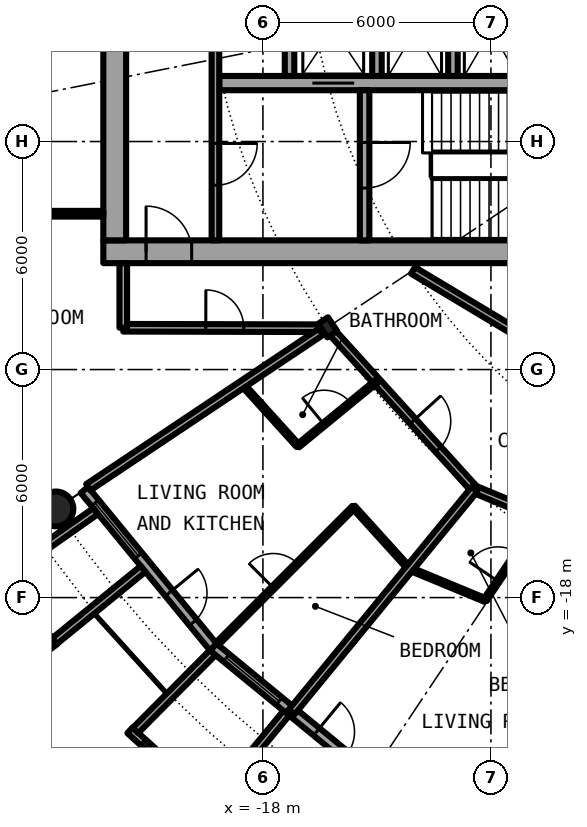
"""IFC4 building model, lengths in metres.
Left out: names, types, materials, properties, quantities, classifications, styles, units other than length and angle.
Written with IfcOpenShell. Run it as: python <this file> out.ifc"""

import sys

from ifc_helpers import new_model, si_unit, direction, frame, frame_2d, origin, origin_2d, place, context, subcontext, project, spatial, rectangle, circle, hollow_circle, i_section, extrude, element, fill, save


model = new_model("IFC4")
c1 = context("Model", 3, precision=1e-05, world=origin(), true_north=direction((0.0, 1.0)))
c2 = subcontext(c1, "Body", "Model", "MODEL_VIEW")
j1 = project(units=[si_unit("LENGTHUNIT", "METRE"), si_unit("PLANEANGLEUNIT", "RADIAN")], contexts=[c1])
p1 = place(None, origin())
s1 = spatial("IfcSite", under=j1, at=p1, CompositionType="ELEMENT")
p2 = place(p1, origin())
s2 = spatial("IfcBuilding", under=s1, at=p2, CompositionType="ELEMENT")
p3 = place(p2, frame((0.0, 0.0, 117.75)))
s3 = spatial("IfcBuildingStorey", under=s2, at=p3, CompositionType="ELEMENT", Elevation=117.75)
p4 = place(p3, frame((-23.448, -15.667, 0.0), z_axis=(0.0, 0.0, 1.0), x_axis=(1.0, 0.0, 0.0)))
e1 = element("IfcColumn", 1, at=p4, inside=s3, PredefinedType="COLUMN", context=c2, shape_type="SweptSolid", body=[
    extrude(hollow_circle(Radius=0.457, WallThickness=0.04, at=origin_2d()), origin(), (0.0, 0.0, 1.0), 3.05),
])
p5 = place(p3, frame((-16.297, -10.889, 0.0), z_axis=(0.0, 0.0, 1.0), x_axis=(-0.831469612303, -0.55557023302, 0.0)))
e2 = element("IfcColumn", 2, at=p5, inside=s3, PredefinedType="COLUMN", context=c2, shape_type="SweptSolid", body=[
    extrude(i_section(OverallWidth=0.307, OverallDepth=0.432, WebThickness=0.021, FlangeThickness=0.04, FilletRadius=0.027, at=origin_2d()), origin(), (0.0, 0.0, 1.0), 3.05),
])
p6 = place(p3, frame((-22.699, -15.167, 0.0), z_axis=(0.0, 0.0, 1.0), x_axis=(0.634382322723, -0.773019449054, 0.0)))
e3 = element("IfcWall", 3, at=p6, inside=s3, PredefinedType="SOLIDWALL", context=c2, shape_type="SweptSolid", body=[
    extrude(rectangle(XDim=5.352, YDim=0.25, at=frame_2d((2.676, 0.0))), origin(), (0.0, 0.0, 1.0), 2.7),
])
p7 = place(p6, frame((0.441, 0.0, 0.3)))
e4 = element("IfcOpeningElement", 4, at=p7, cuts=e3, PredefinedType="OPENING", context=c2, shape_type="SweptSolid", body=[
    extrude(rectangle(XDim=1.8, YDim=2.1, at=frame_2d((0.9, 1.05))), frame((0.0, 0.135, 0.0), z_axis=(0.0, -1.0, 0.0), x_axis=(1.0, 0.0, 0.0)), (0.0, 0.0, 1.0), 0.27),
])
p8 = place(p6, frame((3.51, 0.0, 0.0)))
e5 = element("IfcOpeningElement", 5, at=p8, cuts=e3, PredefinedType="OPENING", context=c2, shape_type="SweptSolid", body=[
    extrude(rectangle(XDim=1.0, YDim=2.2, at=frame_2d((0.5, 1.1))), frame((0.0, 0.135, 0.0), z_axis=(0.0, -1.0, 0.0), x_axis=(1.0, 0.0, 0.0)), (0.0, 0.0, 1.0), 0.27),
])
p9 = place(p3, frame((-24.94, -17.382, -0.03), z_axis=(0.0, 0.0, 1.0), x_axis=(0.603375996329, -0.797456837111, 0.0)))
e6 = element("IfcWall", 6, at=p9, inside=s3, PredefinedType="SOLIDWALL", context=c2, shape_type="SweptSolid", body=[
    extrude(rectangle(XDim=2.391, YDim=0.2, at=frame_2d((1.196, 0.0))), origin(), (0.0, 0.0, 1.0), 2.73),
])
p10 = place(p9, frame((0.156, 0.0, 0.33)))
e7 = element("IfcOpeningElement", 7, at=p10, cuts=e6, PredefinedType="OPENING", context=c2, shape_type="SweptSolid", body=[
    extrude(circle(Radius=1.04, at=frame_2d((1.04, 1.04))), frame((0.0, 0.11, 0.0), z_axis=(0.0, -1.0, 0.0), x_axis=(1.0, 0.0, 0.0)), (0.0, 0.0, 1.0), 0.22),
])
p11 = place(p3, frame((-22.402, -15.726, -0.03), z_axis=(0.0, 0.0, 1.0), x_axis=(-0.818275399393, -0.574826383135, 0.0)))
e8 = element("IfcWall", 8, at=p11, inside=s3, PredefinedType="SOLIDWALL", context=c2, shape_type="SweptSolid", body=[
    extrude(rectangle(XDim=2.929, YDim=0.2, at=frame_2d((1.465, 0.0))), origin(), (0.0, 0.0, 1.0), 2.73),
])
p12 = place(p3, frame((-21.155, -17.246, -0.03), z_axis=(0.0, 0.0, 1.0), x_axis=(-0.775179004516, -0.631741648902, 0.0)))
e9 = element("IfcWall", 9, at=p12, inside=s3, PredefinedType="SOLIDWALL", context=c2, shape_type="SweptSolid", body=[
    extrude(rectangle(XDim=3.006, YDim=0.2, at=frame_2d((1.503, 0.0))), origin(), (0.0, 0.0, 1.0), 2.73),
])
p13 = place(p3, frame((-19.304, -19.304, 0.0), z_axis=(0.0, 0.0, 1.0), x_axis=(0.773019449054, -0.634382322723, 0.0)))
e10 = element("IfcWall", 10, at=p13, inside=s3, PredefinedType="SOLIDWALL", context=c2, shape_type="SweptSolid", body=[
    extrude(rectangle(XDim=5.352, YDim=0.25, at=frame_2d((2.676, 0.0))), origin(), (0.0, 0.0, 1.0), 2.7),
])
p14 = place(p13, frame((0.441, 0.0, 0.3)))
e11 = element("IfcOpeningElement", 11, at=p14, cuts=e10, PredefinedType="OPENING", context=c2, shape_type="SweptSolid", body=[
    extrude(rectangle(XDim=1.8, YDim=2.1, at=frame_2d((0.9, 1.05))), frame((0.0, 0.135, 0.0), z_axis=(0.0, -1.0, 0.0), x_axis=(1.0, 0.0, 0.0)), (0.0, 0.0, 1.0), 0.27),
])
p15 = place(p13, frame((3.51, 0.0, 0.0)))
e12 = element("IfcOpeningElement", 12, at=p15, cuts=e10, PredefinedType="OPENING", context=c2, shape_type="SweptSolid", body=[
    extrude(rectangle(XDim=1.0, YDim=2.2, at=frame_2d((0.5, 1.1))), frame((0.0, 0.135, 0.0), z_axis=(0.0, -1.0, 0.0), x_axis=(1.0, 0.0, 0.0)), (0.0, 0.0, 1.0), 0.27),
])
p16 = place(p3, frame((-21.5, -21.493, -0.03), z_axis=(0.0, 0.0, 1.0), x_axis=(0.740998365753, -0.671506829416, 0.0)))
e13 = element("IfcWall", 13, at=p16, inside=s3, PredefinedType="SOLIDWALL", context=c2, shape_type="SweptSolid", body=[
    extrude(rectangle(XDim=2.993, YDim=0.2, at=frame_2d((1.497, 0.0))), origin(), (0.0, 0.0, 1.0), 2.73),
])
p17 = place(p16, frame((0.457, 0.0, 0.33)))
e14 = element("IfcOpeningElement", 14, at=p17, cuts=e13, PredefinedType="OPENING", context=c2, shape_type="SweptSolid", body=[
    extrude(circle(Radius=1.04, at=frame_2d((1.04, 1.04))), frame((0.0, 0.11, 0.0), z_axis=(0.0, -1.0, 0.0), x_axis=(1.0, 0.0, 0.0)), (0.0, 0.0, 1.0), 0.22),
])
p18 = place(p3, frame((-19.323, -19.45, -0.03), z_axis=(0.0, 0.0, 1.0), x_axis=(-0.704476739375, -0.709727076896, 0.0)))
e15 = element("IfcWall", 15, at=p18, inside=s3, PredefinedType="SOLIDWALL", context=c2, shape_type="SweptSolid", body=[
    extrude(rectangle(XDim=2.883, YDim=0.2, at=frame_2d((1.441, 0.0))), origin(), (0.0, 0.0, 1.0), 2.73),
])
p19 = place(p3, frame((-17.384, -21.041, -0.03), z_axis=(0.0, 0.0, 1.0), x_axis=(-0.63709551667, -0.770784861449, 0.0)))
e16 = element("IfcWall", 16, at=p19, inside=s3, PredefinedType="SOLIDWALL", context=c2, shape_type="SweptSolid", body=[
    extrude(rectangle(XDim=3.006, YDim=0.2, at=frame_2d((1.503, 0.0))), origin(), (0.0, 0.0, 1.0), 2.73),
])
p20 = place(p3, frame((-22.2, -8.9, 0.0), z_axis=(0.0, 0.0, 1.0), x_axis=(1.0, 0.0, 0.0)))
e17 = element("IfcWall", 17, at=p20, inside=s3, PredefinedType="SHEAR", context=c2, shape_type="SweptSolid", body=[
    extrude(rectangle(XDim=13.8, YDim=0.6, at=frame_2d((6.9, 0.0))), origin(), (0.0, 0.0, 1.0), 3.05),
])
p21 = place(p20, frame((1.125, 0.0, 0.0)))
e18 = element("IfcOpeningElement", 18, at=p21, cuts=e17, PredefinedType="OPENING", context=c2, shape_type="SweptSolid", body=[
    extrude(rectangle(XDim=1.2, YDim=2.3, at=frame_2d((0.6, 1.15))), frame((0.0, 0.31, 0.0), z_axis=(0.0, -1.0, 0.0), x_axis=(1.0, 0.0, 0.0)), (0.0, 0.0, 1.0), 0.62),
])
p22 = place(p3, frame((-21.9, -8.6, 0.0), z_axis=(0.0, 0.0, 1.0), x_axis=(0.0, 1.0, 0.0)))
e19 = element("IfcWall", 19, at=p22, inside=s3, PredefinedType="SHEAR", context=c2, shape_type="SweptSolid", body=[
    extrude(rectangle(XDim=17.2, YDim=0.6, at=frame_2d((8.6, 0.0))), origin(), (0.0, 0.0, 1.0), 3.05),
])
p23 = place(p22, frame((7.7, 0.0, 0.0)))
e20 = element("IfcOpeningElement", 20, at=p23, cuts=e19, PredefinedType="OPENING", context=c2, shape_type="SweptSolid", body=[
    extrude(rectangle(XDim=1.8, YDim=2.3, at=frame_2d((0.9, 1.15))), frame((0.0, 0.31, 0.0), z_axis=(0.0, -1.0, 0.0), x_axis=(1.0, 0.0, 0.0)), (0.0, 0.0, 1.0), 0.62),
])
p24 = place(p3, frame((-9.0, -4.462, 0.0), z_axis=(0.0, 0.0, 1.0), x_axis=(-1.0, 0.0, 0.0)))
e21 = element("IfcWall", 21, at=p24, inside=s3, PredefinedType="SHEAR", context=c2, shape_type="SweptSolid", body=[
    extrude(rectangle(XDim=10.15, YDim=0.375, at=frame_2d((5.075, 0.0))), origin(), (0.0, 0.0, 1.0), 3.05),
])
p25 = place(p24, frame((6.6, 0.0, 0.0)))
e22 = element("IfcOpeningElement", 22, at=p25, cuts=e21, PredefinedType="OPENING", context=c2, shape_type="SweptSolid", body=[
    extrude(rectangle(XDim=1.1, YDim=2.3, at=frame_2d((0.55, 1.15))), frame((0.0, 0.198, 0.0), z_axis=(0.0, -1.0, 0.0), x_axis=(1.0, 0.0, 0.0)), (0.0, 0.0, 1.0), 0.395),
])
p26 = place(p3, frame((-15.325, -4.65, 0.0), z_axis=(0.0, 0.0, 1.0), x_axis=(0.0, -1.0, 0.0)))
e23 = element("IfcWall", 23, at=p26, inside=s3, PredefinedType="SHEAR", context=c2, shape_type="SweptSolid", body=[
    extrude(rectangle(XDim=3.95, YDim=0.25, at=frame_2d((1.975, 0.0))), origin(), (0.0, 0.0, 1.0), 3.05),
])
p27 = place(p26, frame((1.375, 0.0, 0.0)))
e24 = element("IfcOpeningElement", 24, at=p27, cuts=e23, PredefinedType="OPENING", context=c2, shape_type="SweptSolid", body=[
    extrude(rectangle(XDim=1.2, YDim=2.3, at=frame_2d((0.6, 1.15))), frame((0.0, 0.135, 0.0), z_axis=(0.0, -1.0, 0.0), x_axis=(1.0, 0.0, 0.0)), (0.0, 0.0, 1.0), 0.27),
])
for number, where, z_axis, x_axis in (
    (25, (-15.0, -1.825, 0.0), (0.0, 0.0, 1.0), (0.0, -1.0, 0.0)),
    (26, (-17.3, -1.825, 0.0), (0.0, 0.0, 1.0), (0.0, -1.0, 0.0)),
):
    element("IfcWall", number, at=place(p3, frame(where, z_axis=z_axis, x_axis=x_axis)), inside=s3, PredefinedType="SOLIDWALL", context=c2, shape_type="SweptSolid", body=[
        extrude(rectangle(XDim=2.45, YDim=0.25, at=frame_2d((1.225, 0.0))), origin(), (0.0, 0.0, 1.0), 2.7),
    ])
p28 = place(p3, frame((-19.25, -1.575, 0.0), z_axis=(0.0, 0.0, 1.0), x_axis=(0.0, -1.0, 0.0)))
e27 = element("IfcWall", 27, at=p28, inside=s3, PredefinedType="SOLIDWALL", context=c2, shape_type="SweptSolid", body=[
    extrude(rectangle(XDim=7.025, YDim=0.2, at=frame_2d((3.513, 0.0))), origin(), (0.0, 0.0, 1.0), 2.7),
])
p29 = place(p28, frame((4.475, 0.0, 0.0)))
e28 = element("IfcOpeningElement", 28, at=p29, cuts=e27, PredefinedType="OPENING", context=c2, shape_type="SweptSolid", body=[
    extrude(rectangle(XDim=1.1, YDim=2.3, at=frame_2d((0.55, 1.15))), frame((0.0, 0.11, 0.0), z_axis=(0.0, -1.0, 0.0), x_axis=(1.0, 0.0, 0.0)), (0.0, 0.0, 1.0), 0.22),
])
p30 = place(p3, frame((-13.0, -1.825, 0.0), z_axis=(0.0, 0.0, 1.0), x_axis=(0.0, -1.0, 0.0)))
e29 = element("IfcWall", 29, at=p30, inside=s3, PredefinedType="SOLIDWALL", context=c2, shape_type="SweptSolid", body=[
    extrude(rectangle(XDim=2.45, YDim=0.25, at=frame_2d((1.225, 0.0))), origin(), (0.0, 0.0, 1.0), 2.7),
])
p31 = place(p3, frame((-22.2, -7.9, 0.0), z_axis=(0.0, 0.0, 1.0), x_axis=(-1.0, 0.0, 0.0)))
e30 = element("IfcWall", 30, at=p31, inside=s3, PredefinedType="PARTITIONING", context=c2, shape_type="SweptSolid", body=[
    extrude(rectangle(XDim=2.74, YDim=0.15, at=frame_2d((1.37, 0.0))), origin(), (0.0, 0.0, 1.0), 2.7),
])
p32 = place(p3, frame((-18.542, -12.389, 0.0), z_axis=(0.0, 0.0, 1.0), x_axis=(0.671396556615, -0.741098282123, 0.0)))
e31 = element("IfcWall", 31, at=p32, inside=s3, PredefinedType="PARTITIONING", context=c2, shape_type="SweptSolid", body=[
    extrude(rectangle(XDim=2.182, YDim=0.1, at=frame_2d((1.091, 0.0))), origin(), (0.0, 0.0, 1.0), 2.7),
])
p33 = place(p3, frame((-15.617, -15.617, 0.0), z_axis=(0.0, 0.0, 1.0), x_axis=(0.671144831591, -0.741326254107, 0.0)))
e32 = element("IfcWall", 32, at=p33, inside=s3, PredefinedType="PARTITIONING", context=c2, shape_type="SweptSolid", body=[
    extrude(rectangle(XDim=2.181, YDim=0.1, at=frame_2d((1.091, 0.0))), origin(), (0.0, 0.0, 1.0), 2.7),
])
p34 = place(p3, frame((-14.147, -17.238, 0.0), z_axis=(0.0, 0.0, 1.0), x_axis=(0.923874819588, -0.382694810171, 0.0)))
e33 = element("IfcWall", 33, at=p34, inside=s3, PredefinedType="PARTITIONING", context=c2, shape_type="SweptSolid", body=[
    extrude(rectangle(XDim=2.158, YDim=0.1, at=frame_2d((1.079, 0.0))), origin(), (0.0, 0.0, 1.0), 2.7),
])
p35 = place(p3, frame((-16.192, -11.004, 0.0), z_axis=(0.0, 0.0, 1.0), x_axis=(0.671481997275, -0.741020868354, 0.0)))
e34 = element("IfcWall", 34, at=p35, inside=s3, PredefinedType="PARTITIONING", context=c2, shape_type="SweptSolid", body=[
    extrude(rectangle(XDim=5.596, YDim=0.2, at=frame_2d((2.798, 0.0))), origin(), (0.0, 0.0, 1.0), 2.39),
])
p36 = place(p35, frame((3.179, 0.0, 0.0)))
e35 = element("IfcOpeningElement", 35, at=p36, cuts=e34, PredefinedType="OPENING", context=c2, shape_type="SweptSolid", body=[
    extrude(rectangle(XDim=1.0, YDim=2.3, at=frame_2d((0.5, 1.15))), frame((0.0, 0.11, 0.0), z_axis=(0.0, -1.0, 0.0), x_axis=(1.0, 0.0, 0.0)), (0.0, 0.0, 1.0), 0.22),
])
p37 = place(p3, frame((-12.434, -15.151, 0.0), z_axis=(0.0, 0.0, 1.0), x_axis=(0.923888467236, -0.382661861319, 0.0)))
e36 = element("IfcWall", 36, at=p37, inside=s3, PredefinedType="PARTITIONING", context=c2, shape_type="SweptSolid", body=[
    extrude(rectangle(XDim=11.381, YDim=0.2, at=frame_2d((5.691, 0.0))), origin(), (0.0, 0.0, 1.0), 2.7),
])
p38 = place(p37, frame((3.292, 0.0, 0.0)))
e37 = element("IfcOpeningElement", 37, at=p38, cuts=e36, PredefinedType="OPENING", context=c2, shape_type="SweptSolid", body=[
    extrude(rectangle(XDim=1.0, YDim=2.3, at=frame_2d((0.5, 1.15))), frame((0.0, 0.11, 0.0), z_axis=(0.0, -1.0, 0.0), x_axis=(1.0, 0.0, 0.0)), (0.0, 0.0, 1.0), 0.22),
])
p39 = place(p3, frame((-14.051, -9.391, 0.0), z_axis=(0.0, 0.0, 1.0), x_axis=(0.857768591583, -0.514036033069, 0.0)))
e38 = element("IfcWall", 38, at=p39, inside=s3, PredefinedType="PARTITIONING", context=c2, shape_type="SweptSolid", body=[
    extrude(rectangle(XDim=14.45, YDim=0.2, at=frame_2d((7.225, 0.0))), origin(), (0.0, 0.0, 1.0), 2.7),
])
p40 = place(p39, frame((9.133, 0.0, 0.0)))
e39 = element("IfcOpeningElement", 39, at=p40, cuts=e38, PredefinedType="OPENING", context=c2, shape_type="SweptSolid", body=[
    extrude(rectangle(XDim=1.0, YDim=2.3, at=frame_2d((0.5, 1.15))), frame((0.0, 0.11, 0.0), z_axis=(0.0, -1.0, 0.0), x_axis=(1.0, 0.0, 0.0)), (0.0, 0.0, 1.0), 0.22),
])
p41 = place(p3, frame((-21.675, -10.9, 0.0), z_axis=(0.0, 0.0, 1.0), x_axis=(0.999997173357, -0.002377662213, 0.0)))
e40 = element("IfcWall", 40, at=p41, inside=s3, PredefinedType="PARTITIONING", context=c2, shape_type="SweptSolid", body=[
    extrude(rectangle(XDim=5.134, YDim=0.2, at=frame_2d((2.567, 0.0))), origin(), (0.0, 0.0, 1.0), 2.7),
])
p42 = place(p41, frame((2.171, 0.0, 0.0)))
e41 = element("IfcOpeningElement", 41, at=p42, cuts=e40, PredefinedType="OPENING", context=c2, shape_type="SweptSolid", body=[
    extrude(rectangle(XDim=1.0, YDim=2.3, at=frame_2d((0.5, 1.15))), frame((0.0, 0.11, 0.0), z_axis=(0.0, -1.0, 0.0), x_axis=(1.0, 0.0, 0.0)), (0.0, 0.0, 1.0), 0.22),
])
p43 = place(p3, frame((-22.595, -15.097, 0.0), z_axis=(0.0, 0.0, 1.0), x_axis=(0.831467903109, 0.555572791, 0.0)))
e42 = element("IfcWall", 42, at=p43, inside=s3, PredefinedType="PARTITIONING", context=c2, shape_type="SweptSolid", body=[
    extrude(rectangle(XDim=7.358, YDim=0.2, at=frame_2d((3.679, 0.0))), origin(), (0.0, 0.0, 1.0), 2.7),
])
p44 = place(p3, frame((-19.21, -19.222, 0.0), z_axis=(0.0, 0.0, 1.0), x_axis=(0.706914880313, 0.707298629994, 0.0)))
e43 = element("IfcWall", 43, at=p44, inside=s3, PredefinedType="PARTITIONING", context=c2, shape_type="SweptSolid", body=[
    extrude(rectangle(XDim=5.09, YDim=0.1, at=frame_2d((2.545, 0.0))), origin(), (0.0, 0.0, 1.0), 2.7),
])
p45 = place(p44, frame((2.095, 0.0, 0.0)))
e44 = element("IfcOpeningElement", 44, at=p45, cuts=e43, PredefinedType="OPENING", context=c2, shape_type="SweptSolid", body=[
    extrude(rectangle(XDim=0.9, YDim=2.3, at=frame_2d((0.45, 1.15))), frame((0.0, 0.06, 0.0), z_axis=(0.0, -1.0, 0.0), x_axis=(1.0, 0.0, 0.0)), (0.0, 0.0, 1.0), 0.12),
])
p46 = place(p3, frame((-17.24, -21.007, 0.0), z_axis=(0.0, 0.0, 1.0), x_axis=(0.634381303318, 0.773020285633, 0.0)))
e45 = element("IfcWall", 45, at=p46, inside=s3, PredefinedType="PARTITIONING", context=c2, shape_type="SweptSolid", body=[
    extrude(rectangle(XDim=7.576, YDim=0.2, at=frame_2d((3.788, 0.0))), origin(), (0.0, 0.0, 1.0), 2.7),
])
p47 = place(p3, frame((-17.077, -14.006, 0.0), z_axis=(0.0, 0.0, 1.0), x_axis=(0.77319617123, 0.634166918717, 0.0)))
e46 = element("IfcWall", 46, at=p47, inside=s3, PredefinedType="PARTITIONING", context=c2, shape_type="SweptSolid", body=[
    extrude(rectangle(XDim=2.675, YDim=0.1, at=frame_2d((1.337, 0.0))), origin(), (0.0, 0.0, 1.0), 2.7),
])
p48 = place(p47, frame((0.887, 0.0, 0.0)))
e47 = element("IfcOpeningElement", 47, at=p48, cuts=e46, PredefinedType="OPENING", context=c2, shape_type="SweptSolid", body=[
    extrude(rectangle(XDim=0.9, YDim=2.3, at=frame_2d((0.45, 1.15))), frame((0.0, 0.06, 0.0), z_axis=(0.0, -1.0, 0.0), x_axis=(1.0, 0.0, 0.0)), (0.0, 0.0, 1.0), 0.12),
])
p49 = place(p3, frame((-12.153, -18.064, 0.0), z_axis=(0.0, 0.0, 1.0), x_axis=(0.557893831879, 0.829912328112, 0.0)))
e48 = element("IfcWall", 48, at=p49, inside=s3, PredefinedType="PARTITIONING", context=c2, shape_type="SweptSolid", body=[
    extrude(rectangle(XDim=1.956, YDim=0.1, at=frame_2d((0.978, 0.0))), origin(), (0.0, 0.0, 1.0), 2.7),
])
p50 = place(p49, frame((0.6, 0.0, 0.0)))
e49 = element("IfcOpeningElement", 49, at=p50, cuts=e48, PredefinedType="OPENING", context=c2, shape_type="SweptSolid", body=[
    extrude(rectangle(XDim=0.9, YDim=2.3, at=frame_2d((0.45, 1.15))), frame((0.0, 0.06, 0.0), z_axis=(0.0, -1.0, 0.0), x_axis=(1.0, 0.0, 0.0)), (0.0, 0.0, 1.0), 0.12),
])
p51 = place(p3, frame((-21.675, -10.9, 0.0), z_axis=(0.0, 0.0, 1.0), x_axis=(0.0, 1.0, 0.0)))
e50 = element("IfcWall", 50, at=p51, inside=s3, PredefinedType="PARTITIONING", context=c2, shape_type="SweptSolid", body=[
    extrude(rectangle(XDim=1.7, YDim=0.2, at=frame_2d((0.85, 0.0))), origin(), (0.0, 0.0, 1.0), 2.7),
])
p52 = place(p7, origin())
e51 = element("IfcWindow", 51, at=p52, inside=s3, PartitioningType="SINGLE_PANEL", PredefinedType="WINDOW", context=c2, shape_type="SweptSolid", body=[
    extrude(rectangle(XDim=1.8, YDim=2.1, at=frame_2d((0.9, 1.05))), frame((0.0, 0.03, 0.0), z_axis=(0.0, -1.0, 0.0), x_axis=(1.0, 0.0, 0.0)), (0.0, 0.0, 1.0), 0.06),
])
fill(e4, e51)
p53 = place(p8, origin())
e52 = element("IfcDoor", 52, at=p53, inside=s3, OperationType="SINGLE_SWING_LEFT", PredefinedType="DOOR", context=c2, shape_type="SweptSolid", body=[
    extrude(rectangle(XDim=1.0, YDim=2.2, at=frame_2d((0.5, 1.1))), frame((0.0, 0.025, 0.0), z_axis=(0.0, -1.0, 0.0), x_axis=(1.0, 0.0, 0.0)), (0.0, 0.0, 1.0), 0.05),
])
fill(e5, e52)
p54 = place(p14, origin())
e53 = element("IfcWindow", 53, at=p54, inside=s3, PartitioningType="SINGLE_PANEL", PredefinedType="WINDOW", context=c2, shape_type="SweptSolid", body=[
    extrude(rectangle(XDim=1.8, YDim=2.1, at=frame_2d((0.9, 1.05))), frame((0.0, 0.03, 0.0), z_axis=(0.0, -1.0, 0.0), x_axis=(1.0, 0.0, 0.0)), (0.0, 0.0, 1.0), 0.06),
])
fill(e11, e53)
p55 = place(p17, origin())
e54 = element("IfcWindow", 54, at=p55, inside=s3, PartitioningType="SINGLE_PANEL", PredefinedType="WINDOW", context=c2, shape_type="SweptSolid", body=[
    extrude(circle(Radius=1.04, at=frame_2d((1.04, 1.04))), frame((0.0, 0.03, 0.0), z_axis=(0.0, -1.0, 0.0), x_axis=(1.0, 0.0, 0.0)), (0.0, 0.0, 1.0), 0.06),
])
fill(e14, e54)
p56 = place(p15, origin())
e55 = element("IfcDoor", 55, at=p56, inside=s3, OperationType="SINGLE_SWING_LEFT", PredefinedType="DOOR", context=c2, shape_type="SweptSolid", body=[
    extrude(rectangle(XDim=1.0, YDim=2.2, at=frame_2d((0.5, 1.1))), frame((0.0, 0.025, 0.0), z_axis=(0.0, -1.0, 0.0), x_axis=(1.0, 0.0, 0.0)), (0.0, 0.0, 1.0), 0.05),
])
fill(e12, e55)
p57 = place(p25, origin())
e56 = element("IfcDoor", 56, at=p57, inside=s3, OperationType="DOUBLE_DOOR_SLIDING", PredefinedType="DOOR", context=c2, shape_type="SweptSolid", body=[
    extrude(rectangle(XDim=1.1, YDim=2.3, at=frame_2d((0.55, 1.15))), frame((0.0, 0.025, 0.0), z_axis=(0.0, -1.0, 0.0), x_axis=(1.0, 0.0, 0.0)), (0.0, 0.0, 1.0), 0.05),
])
fill(e22, e56)
p58 = place(p27, origin())
e57 = element("IfcDoor", 57, at=p58, inside=s3, OperationType="SINGLE_SWING_LEFT", PredefinedType="DOOR", context=c2, shape_type="SweptSolid", body=[
    extrude(rectangle(XDim=1.2, YDim=2.3, at=frame_2d((0.6, 1.15))), frame((0.0, 0.025, 0.0), z_axis=(0.0, -1.0, 0.0), x_axis=(1.0, 0.0, 0.0)), (0.0, 0.0, 1.0), 0.05),
])
fill(e24, e57)
p59 = place(p29, origin())
e58 = element("IfcDoor", 58, at=p59, inside=s3, OperationType="SINGLE_SWING_LEFT", PredefinedType="DOOR", context=c2, shape_type="SweptSolid", body=[
    extrude(rectangle(XDim=1.1, YDim=2.3, at=frame_2d((0.55, 1.15))), frame((0.0, 0.025, 0.0), z_axis=(0.0, -1.0, 0.0), x_axis=(1.0, 0.0, 0.0)), (0.0, 0.0, 1.0), 0.05),
])
fill(e28, e58)
p60 = place(p21, origin())
e59 = element("IfcDoor", 59, at=p60, inside=s3, OperationType="SINGLE_SWING_RIGHT", PredefinedType="DOOR", context=c2, shape_type="SweptSolid", body=[
    extrude(rectangle(XDim=1.2, YDim=2.3, at=frame_2d((0.6, 1.15))), frame((0.0, 0.025, 0.0), z_axis=(0.0, -1.0, 0.0), x_axis=(1.0, 0.0, 0.0)), (0.0, 0.0, 1.0), 0.05),
])
fill(e18, e59)
p61 = place(p36, origin())
e60 = element("IfcDoor", 60, at=p61, inside=s3, OperationType="SINGLE_SWING_RIGHT", PredefinedType="DOOR", context=c2, shape_type="SweptSolid", body=[
    extrude(rectangle(XDim=1.0, YDim=2.3, at=frame_2d((0.5, 1.15))), frame((0.0, 0.025, 0.0), z_axis=(0.0, -1.0, 0.0), x_axis=(1.0, 0.0, 0.0)), (0.0, 0.0, 1.0), 0.05),
])
fill(e35, e60)
p62 = place(p48, origin())
e61 = element("IfcDoor", 61, at=p62, inside=s3, OperationType="SINGLE_SWING_LEFT", PredefinedType="DOOR", context=c2, shape_type="SweptSolid", body=[
    extrude(rectangle(XDim=0.9, YDim=2.3, at=frame_2d((0.45, 1.15))), frame((0.0, 0.025, 0.0), z_axis=(0.0, -1.0, 0.0), x_axis=(1.0, 0.0, 0.0)), (0.0, 0.0, 1.0), 0.05),
])
fill(e47, e61)
p63 = place(p45, origin())
e62 = element("IfcDoor", 62, at=p63, inside=s3, OperationType="SINGLE_SWING_RIGHT", PredefinedType="DOOR", context=c2, shape_type="SweptSolid", body=[
    extrude(rectangle(XDim=0.9, YDim=2.3, at=frame_2d((0.45, 1.15))), frame((0.0, 0.025, 0.0), z_axis=(0.0, -1.0, 0.0), x_axis=(1.0, 0.0, 0.0)), (0.0, 0.0, 1.0), 0.05),
])
fill(e44, e62)
p64 = place(p50, origin())
e63 = element("IfcDoor", 63, at=p64, inside=s3, OperationType="SINGLE_SWING_RIGHT", PredefinedType="DOOR", context=c2, shape_type="SweptSolid", body=[
    extrude(rectangle(XDim=0.9, YDim=2.3, at=frame_2d((0.45, 1.15))), frame((0.0, 0.025, 0.0), z_axis=(0.0, -1.0, 0.0), x_axis=(1.0, 0.0, 0.0)), (0.0, 0.0, 1.0), 0.05),
])
fill(e49, e63)
p65 = place(p42, origin())
e64 = element("IfcDoor", 64, at=p65, inside=s3, OperationType="SINGLE_SWING_RIGHT", PredefinedType="DOOR", context=c2, shape_type="SweptSolid", body=[
    extrude(rectangle(XDim=1.0, YDim=2.3, at=frame_2d((0.5, 1.15))), frame((0.0, 0.025, 0.0), z_axis=(0.0, -1.0, 0.0), x_axis=(1.0, 0.0, 0.0)), (0.0, 0.0, 1.0), 0.05),
])
fill(e41, e64)
save(model, sys.argv[1])
